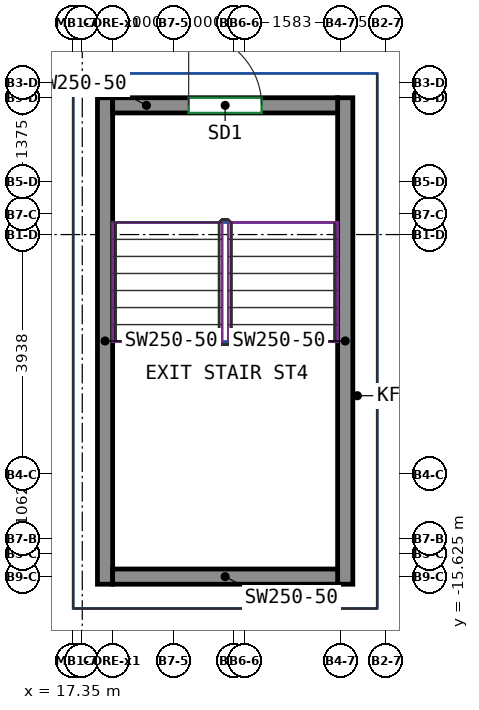
"""IFC4 building model, lengths in metres.
Left out: names, types, materials, properties, quantities, classifications, styles, units other than length and angle.
Written with IfcOpenShell. Run it as: python <this file> out.ifc"""

import sys

from ifc_helpers import new_model, si_unit, direction, frame, frame_2d, origin, place, context, subcontext, project, spatial, rectangle, extrude, source, transform, mapped, element, fill, save


model = new_model("IFC4")
c1 = context("Model", 3, precision=1e-05, world=origin(), true_north=direction((0.0, 1.0)))
c2 = subcontext(c1, "Body", "Model", "MODEL_VIEW")
j1 = project(units=[si_unit("LENGTHUNIT", "METRE"), si_unit("PLANEANGLEUNIT", "RADIAN")], contexts=[c1])
p1 = place(None, origin())
s1 = spatial("IfcSite", under=j1, at=p1, CompositionType="ELEMENT")
p2 = place(p1, origin())
s2 = spatial("IfcBuilding", under=s1, at=p2, CompositionType="ELEMENT")
p3 = place(p2, frame((0.0, 0.0, 318.8)))
s3 = spatial("IfcBuildingStorey", under=s2, at=p3, CompositionType="ELEMENT", Elevation=318.8)
m1 = source(origin(), c2, "Body", "SweptSolid", [
    extrude(rectangle(XDim=8.0, YDim=0.25, at=frame_2d((4.0, 0.0))), origin(), (0.0, 0.0, 1.0), 5.0),
])
for number, where, z_axis, x_axis in (
    (1, (17.875, -15.75, -0.4), (0.0, 0.0, 1.0), (0.0, 1.0, 0.0)),
    (2, (21.825, -15.75, -0.4), (0.0, 0.0, 1.0), (0.0, 1.0, 0.0)),
):
    element("IfcWall", number, at=place(p3, frame(where, z_axis=z_axis, x_axis=x_axis)), inside=s3, PredefinedType="SHEAR", context=c2, shape_type="MappedRepresentation", body=[
        mapped(m1, transform((0.0, 0.0, 0.0))),
    ])
m2 = source(origin(), c2, "Body", "SweptSolid", [
    extrude(rectangle(XDim=3.7, YDim=0.25, at=frame_2d((1.85, 0.0))), origin(), (0.0, 0.0, 1.0), 5.0),
])
p4 = place(p3, frame((18.0, -15.625, -0.4), z_axis=(0.0, 0.0, 1.0), x_axis=(1.0, 0.0, 0.0)))
e3 = element("IfcWall", 3, at=p4, inside=s3, PredefinedType="SHEAR", context=c2, shape_type="MappedRepresentation", body=[
    mapped(m2, transform((0.0, 0.0, 0.0))),
])
p5 = place(p3, frame((18.0, -7.875, -0.4), z_axis=(0.0, 0.0, 1.0), x_axis=(1.0, 0.0, 0.0)))
e4 = element("IfcWall", 4, at=p5, inside=s3, PredefinedType="SHEAR", context=c2, shape_type="MappedRepresentation", body=[
    mapped(m2, transform((0.0, 0.0, 0.0))),
])
p6 = place(p5, frame((1.25, 0.0, 0.4)))
e5 = element("IfcOpeningElement", 5, at=p6, cuts=e4, PredefinedType="OPENING", context=c2, shape_type="SweptSolid", body=[
    extrude(rectangle(XDim=1.2, YDim=2.1, at=frame_2d((0.6, 1.05))), frame((0.0, 0.135, 0.0), z_axis=(0.0, -1.0, 0.0), x_axis=(1.0, 0.0, 0.0)), (0.0, 0.0, 1.0), 0.27),
])
p7 = place(p6, origin())
e6 = element("IfcDoor", 6, at=p7, inside=s3, OperationType="DOUBLE_DOOR_SINGLE_SWING", PredefinedType="DOOR", context=c2, shape_type="SweptSolid", body=[
    extrude(rectangle(XDim=1.2, YDim=2.1, at=frame_2d((0.6, 1.05))), frame((0.0, 0.025, 0.0), z_axis=(0.0, -1.0, 0.0), x_axis=(1.0, 0.0, 0.0)), (0.0, 0.0, 1.0), 0.05),
])
fill(e5, e6)
save(model, sys.argv[1])
